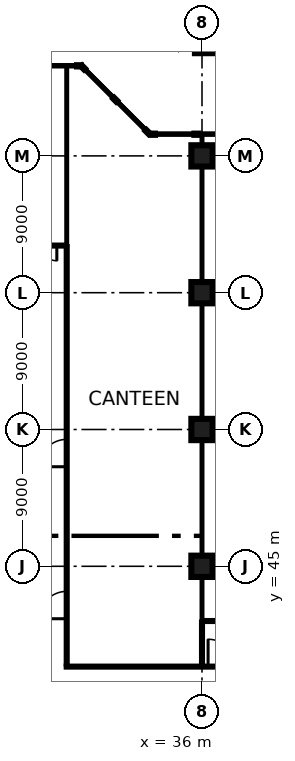
"""IFC4 building model, lengths in metres.
Left out: names, types, materials, properties, quantities, classifications, styles, units other than length and angle.
Written with IfcOpenShell. Run it as: python <this file> out.ifc"""

import sys

from ifc_helpers import new_model, si_unit, direction, frame, frame_2d, origin, origin_2d, place, context, subcontext, project, spatial, rectangle, extrude, element, fill, save


model = new_model("IFC4")
c1 = context("Model", 3, precision=1e-05, world=origin(), true_north=direction((0.0, 1.0)))
c2 = subcontext(c1, "Body", "Model", "MODEL_VIEW")
j1 = project(units=[si_unit("LENGTHUNIT", "METRE"), si_unit("PLANEANGLEUNIT", "RADIAN")], contexts=[c1])
p1 = place(None, origin())
s1 = spatial("IfcSite", under=j1, at=p1, CompositionType="ELEMENT")
p2 = place(p1, origin())
s2 = spatial("IfcBuilding", under=s1, at=p2, CompositionType="ELEMENT")
p3 = place(p2, origin())
s3 = spatial("IfcBuildingStorey", under=s2, at=p3, CompositionType="ELEMENT", Elevation=0.0)
for number, where, z_axis, x_axis in (
    (1, (36.0, 45.0, 0.0), (0.0, 0.0, 1.0), (1.0, 0.0, 0.0)),
    (2, (36.0, 54.0, 0.0), (0.0, 0.0, 1.0), (1.0, 0.0, 0.0)),
    (3, (36.0, 63.0, 0.0), (0.0, 0.0, 1.0), (1.0, 0.0, 0.0)),
    (4, (36.0, 72.0, 0.0), (0.0, 0.0, 1.0), (1.0, 0.0, 0.0)),
):
    element("IfcColumn", number, at=place(p3, frame(where, z_axis=z_axis, x_axis=x_axis)), inside=s3, PredefinedType="COLUMN", context=c2, shape_type="SweptSolid", body=[
        extrude(rectangle(XDim=1.4, YDim=1.4, at=origin_2d()), origin(), (0.0, 0.0, 1.0), 7.2),
    ])
p4 = place(p3, frame((-3.0, 66.1, 0.0), z_axis=(0.0, 0.0, 1.0), x_axis=(1.0, 0.0, 0.0)))
e5 = element("IfcWall", 5, at=p4, inside=s3, PredefinedType="PARTITIONING", context=c2, shape_type="SweptSolid", body=[
    extrude(rectangle(XDim=30.0, YDim=0.2, at=frame_2d((15.0, 0.0))), origin(), (0.0, 0.0, 1.0), 6.8),
])
p5 = place(p4, frame((0.65, 0.0, 0.0)))
e6 = element("IfcOpeningElement", 6, at=p5, cuts=e5, PredefinedType="OPENING", context=c2, shape_type="SweptSolid", body=[
    extrude(rectangle(XDim=1.0, YDim=2.1, at=frame_2d((0.5, 1.05))), frame((0.0, 0.11, 0.0), z_axis=(0.0, -1.0, 0.0), x_axis=(1.0, 0.0, 0.0)), (0.0, 0.0, 1.0), 0.22),
])
p6 = place(p4, frame((8.6, 0.0, 0.0)))
e7 = element("IfcOpeningElement", 7, at=p6, cuts=e5, PredefinedType="OPENING", context=c2, shape_type="SweptSolid", body=[
    extrude(rectangle(XDim=1.0, YDim=2.1, at=frame_2d((0.5, 1.05))), frame((0.0, 0.11, 0.0), z_axis=(0.0, -1.0, 0.0), x_axis=(1.0, 0.0, 0.0)), (0.0, 0.0, 1.0), 0.22),
])
p7 = place(p4, frame((22.35, 0.0, 0.0)))
e8 = element("IfcOpeningElement", 8, at=p7, cuts=e5, PredefinedType="OPENING", context=c2, shape_type="SweptSolid", body=[
    extrude(rectangle(XDim=1.0, YDim=2.1, at=frame_2d((0.5, 1.05))), frame((0.0, 0.11, 0.0), z_axis=(0.0, -1.0, 0.0), x_axis=(1.0, 0.0, 0.0)), (0.0, 0.0, 1.0), 0.22),
])
p8 = place(p4, frame((28.45, 0.0, 0.0)))
e9 = element("IfcOpeningElement", 9, at=p8, cuts=e5, PredefinedType="OPENING", context=c2, shape_type="SweptSolid", body=[
    extrude(rectangle(XDim=1.0, YDim=2.1, at=frame_2d((0.5, 1.05))), frame((0.0, 0.11, 0.0), z_axis=(0.0, -1.0, 0.0), x_axis=(1.0, 0.0, 0.0)), (0.0, 0.0, 1.0), 0.22),
])
p9 = place(p4, frame((16.15, 0.0, 0.0)))
e10 = element("IfcOpeningElement", 10, at=p9, cuts=e5, PredefinedType="OPENING", context=c2, shape_type="SweptSolid", body=[
    extrude(rectangle(XDim=1.8, YDim=2.1, at=frame_2d((0.9, 1.05))), frame((0.0, 0.11, 0.0), z_axis=(0.0, -1.0, 0.0), x_axis=(1.0, 0.0, 0.0)), (0.0, 0.0, 1.0), 0.22),
])
p10 = place(p3, frame((27.0, 38.4, 0.0), z_axis=(0.0, 0.0, 1.0), x_axis=(1.0, 0.0, 0.0)))
e11 = element("IfcWall", 11, at=p10, inside=s3, PredefinedType="PARTITIONING", context=c2, shape_type="SweptSolid", body=[
    extrude(rectangle(XDim=49.586, YDim=0.2, at=frame_2d((24.793, 0.0))), origin(), (0.0, 0.0, 1.0), 6.8),
])
p11 = place(p10, frame((21.9, 0.0, 0.0)))
e12 = element("IfcOpeningElement", 12, at=p11, cuts=e11, PredefinedType="OPENING", context=c2, shape_type="SweptSolid", body=[
    extrude(rectangle(XDim=1.0, YDim=2.1, at=frame_2d((0.5, 1.05))), frame((0.0, 0.11, 0.0), z_axis=(0.0, -1.0, 0.0), x_axis=(1.0, 0.0, 0.0)), (0.0, 0.0, 1.0), 0.22),
])
p12 = place(p10, frame((30.9, 0.0, 0.0)))
e13 = element("IfcOpeningElement", 13, at=p12, cuts=e11, PredefinedType="OPENING", context=c2, shape_type="SweptSolid", body=[
    extrude(rectangle(XDim=1.0, YDim=2.1, at=frame_2d((0.5, 1.05))), frame((0.0, 0.11, 0.0), z_axis=(0.0, -1.0, 0.0), x_axis=(1.0, 0.0, 0.0)), (0.0, 0.0, 1.0), 0.22),
])
p13 = place(p10, frame((39.9, 0.0, 0.0)))
e14 = element("IfcOpeningElement", 14, at=p13, cuts=e11, PredefinedType="OPENING", context=c2, shape_type="SweptSolid", body=[
    extrude(rectangle(XDim=1.0, YDim=2.1, at=frame_2d((0.5, 1.05))), frame((0.0, 0.11, 0.0), z_axis=(0.0, -1.0, 0.0), x_axis=(1.0, 0.0, 0.0)), (0.0, 0.0, 1.0), 0.22),
])
p14 = place(p10, frame((46.9, 0.0, 0.0)))
e15 = element("IfcOpeningElement", 15, at=p14, cuts=e11, PredefinedType="OPENING", context=c2, shape_type="SweptSolid", body=[
    extrude(rectangle(XDim=1.0, YDim=2.1, at=frame_2d((0.5, 1.05))), frame((0.0, 0.11, 0.0), z_axis=(0.0, -1.0, 0.0), x_axis=(1.0, 0.0, 0.0)), (0.0, 0.0, 1.0), 0.22),
])
p15 = place(p10, frame((9.4, 0.0, 0.0)))
e16 = element("IfcOpeningElement", 16, at=p15, cuts=e11, PredefinedType="OPENING", context=c2, shape_type="SweptSolid", body=[
    extrude(rectangle(XDim=1.8, YDim=2.1, at=frame_2d((0.9, 1.05))), frame((0.0, 0.11, 0.0), z_axis=(0.0, -1.0, 0.0), x_axis=(1.0, 0.0, 0.0)), (0.0, 0.0, 1.0), 0.22),
])
p16 = place(p3, frame((27.1, 38.5, 0.0), z_axis=(0.0, 0.0, 1.0), x_axis=(0.0, 1.0, 0.0)))
e17 = element("IfcWall", 17, at=p16, inside=s3, PredefinedType="PARTITIONING", context=c2, shape_type="SweptSolid", body=[
    extrude(rectangle(XDim=27.6, YDim=0.2, at=frame_2d((13.8, 0.0))), origin(), (0.0, 0.0, 1.0), 6.8),
])
p17 = place(p16, frame((13.05, 0.0, 0.0)))
e18 = element("IfcOpeningElement", 18, at=p17, cuts=e17, PredefinedType="OPENING", context=c2, shape_type="SweptSolid", body=[
    extrude(rectangle(XDim=1.8, YDim=2.1, at=frame_2d((0.9, 1.05))), frame((0.0, 0.11, 0.0), z_axis=(0.0, -1.0, 0.0), x_axis=(1.0, 0.0, 0.0)), (0.0, 0.0, 1.0), 0.22),
])
p18 = place(p16, frame((3.05, 0.0, 0.0)))
e19 = element("IfcOpeningElement", 19, at=p18, cuts=e17, PredefinedType="OPENING", context=c2, shape_type="SweptSolid", body=[
    extrude(rectangle(XDim=1.8, YDim=2.1, at=frame_2d((0.9, 1.05))), frame((0.0, 0.11, 0.0), z_axis=(0.0, -1.0, 0.0), x_axis=(1.0, 0.0, 0.0)), (0.0, 0.0, 1.0), 0.22),
])
p19 = place(p3, frame((27.1, 66.1, 0.0), z_axis=(0.0, 0.0, 1.0), x_axis=(0.0, 1.0, 0.0)))
e20 = element("IfcWall", 20, at=p19, inside=s3, PredefinedType="PARTITIONING", context=c2, shape_type="SweptSolid", body=[
    extrude(rectangle(XDim=11.825, YDim=0.125, at=frame_2d((5.913, 0.0))), origin(), (0.0, 0.0, 1.0), 6.8),
])
p20 = place(p3, frame((36.0, 38.5, 0.0), z_axis=(0.0, 0.0, 1.0), x_axis=(0.0, 1.0, 0.0)))
e21 = element("IfcWall", 21, at=p20, inside=s3, PredefinedType="PARTITIONING", context=c2, shape_type="SweptSolid", body=[
    extrude(rectangle(XDim=2.9, YDim=0.2, at=frame_2d((1.45, 0.0))), origin(), (0.0, 0.0, 1.0), 6.8),
])
p21 = place(p3, frame((36.0, 41.4, 0.0), z_axis=(0.0, 0.0, 1.0), x_axis=(0.0, 1.0, 0.0)))
e22 = element("IfcWall", 22, at=p21, inside=s3, PredefinedType="PARTITIONING", context=c2, shape_type="SweptSolid", body=[
    extrude(rectangle(XDim=32.025, YDim=0.125, at=frame_2d((16.013, 0.0))), origin(), (0.0, 0.0, 1.0), 6.8),
])
p22 = place(p3, frame((36.1, 41.4, 0.0), z_axis=(0.0, 0.0, 1.0), x_axis=(1.0, 0.0, 0.0)))
e23 = element("IfcWall", 23, at=p22, inside=s3, PredefinedType="PARTITIONING", context=c2, shape_type="SweptSolid", body=[
    extrude(rectangle(XDim=37.325, YDim=0.2, at=frame_2d((18.663, 0.0))), origin(), (0.0, 0.0, 1.0), 6.8),
])
p23 = place(p22, frame((3.45, 0.0, 0.0)))
e24 = element("IfcOpeningElement", 24, at=p23, cuts=e23, PredefinedType="OPENING", context=c2, shape_type="SweptSolid", body=[
    extrude(rectangle(XDim=1.8, YDim=2.1, at=frame_2d((0.9, 1.05))), frame((0.0, 0.11, 0.0), z_axis=(0.0, -1.0, 0.0), x_axis=(1.0, 0.0, 0.0)), (0.0, 0.0, 1.0), 0.22),
])
p24 = place(p22, frame((21.45, 0.0, 0.0)))
e25 = element("IfcOpeningElement", 25, at=p24, cuts=e23, PredefinedType="OPENING", context=c2, shape_type="SweptSolid", body=[
    extrude(rectangle(XDim=1.8, YDim=2.1, at=frame_2d((0.9, 1.05))), frame((0.0, 0.11, 0.0), z_axis=(0.0, -1.0, 0.0), x_axis=(1.0, 0.0, 0.0)), (0.0, 0.0, 1.0), 0.22),
])
p25 = place(p22, frame((30.45, 0.0, 0.0)))
e26 = element("IfcOpeningElement", 26, at=p25, cuts=e23, PredefinedType="OPENING", context=c2, shape_type="SweptSolid", body=[
    extrude(rectangle(XDim=1.8, YDim=2.1, at=frame_2d((0.9, 1.05))), frame((0.0, 0.11, 0.0), z_axis=(0.0, -1.0, 0.0), x_axis=(1.0, 0.0, 0.0)), (0.0, 0.0, 1.0), 0.22),
])
p26 = place(p22, frame((33.95, 0.0, 0.0)))
e27 = element("IfcOpeningElement", 27, at=p26, cuts=e23, PredefinedType="OPENING", context=c2, shape_type="SweptSolid", body=[
    extrude(rectangle(XDim=1.8, YDim=2.1, at=frame_2d((0.9, 1.05))), frame((0.0, 0.11, 0.0), z_axis=(0.0, -1.0, 0.0), x_axis=(1.0, 0.0, 0.0)), (0.0, 0.0, 1.0), 0.22),
])
p27 = place(p22, frame((36.175, 0.0, 0.0)))
e28 = element("IfcOpeningElement", 28, at=p27, cuts=e23, PredefinedType="OPENING", context=c2, shape_type="SweptSolid", body=[
    extrude(rectangle(XDim=1.0, YDim=2.1, at=frame_2d((0.5, 1.05))), frame((0.0, 0.11, 0.0), z_axis=(0.0, -1.0, 0.0), x_axis=(1.0, 0.0, 0.0)), (0.0, 0.0, 1.0), 0.22),
])
p28 = place(p17, origin())
e29 = element("IfcDoor", 29, at=p28, inside=s3, OperationType="DOUBLE_DOOR_SINGLE_SWING", PredefinedType="DOOR", context=c2, shape_type="SweptSolid", body=[
    extrude(rectangle(XDim=1.8, YDim=2.1, at=frame_2d((0.9, 1.05))), frame((0.0, 0.025, 0.0), z_axis=(0.0, -1.0, 0.0), x_axis=(1.0, 0.0, 0.0)), (0.0, 0.0, 1.0), 0.05),
])
fill(e18, e29)
p29 = place(p18, origin())
e30 = element("IfcDoor", 30, at=p29, inside=s3, OperationType="DOUBLE_DOOR_SINGLE_SWING", PredefinedType="DOOR", context=c2, shape_type="SweptSolid", body=[
    extrude(rectangle(XDim=1.8, YDim=2.1, at=frame_2d((0.9, 1.05))), frame((0.0, 0.025, 0.0), z_axis=(0.0, -1.0, 0.0), x_axis=(1.0, 0.0, 0.0)), (0.0, 0.0, 1.0), 0.05),
])
fill(e19, e30)
p30 = place(p15, origin())
e31 = element("IfcDoor", 31, at=p30, inside=s3, OperationType="DOUBLE_DOOR_SINGLE_SWING", PredefinedType="DOOR", context=c2, shape_type="SweptSolid", body=[
    extrude(rectangle(XDim=1.8, YDim=2.1, at=frame_2d((0.9, 1.05))), frame((0.0, 0.025, 0.0), z_axis=(0.0, -1.0, 0.0), x_axis=(1.0, 0.0, 0.0)), (0.0, 0.0, 1.0), 0.05),
])
fill(e16, e31)
p31 = place(p8, origin())
e32 = element("IfcDoor", 32, at=p31, inside=s3, OperationType="SINGLE_SWING_RIGHT", PredefinedType="DOOR", context=c2, shape_type="SweptSolid", body=[
    extrude(rectangle(XDim=1.0, YDim=2.1, at=frame_2d((0.5, 1.05))), frame((0.0, 0.025, 0.0), z_axis=(0.0, -1.0, 0.0), x_axis=(1.0, 0.0, 0.0)), (0.0, 0.0, 1.0), 0.05),
])
fill(e9, e32)
save(model, sys.argv[1])
